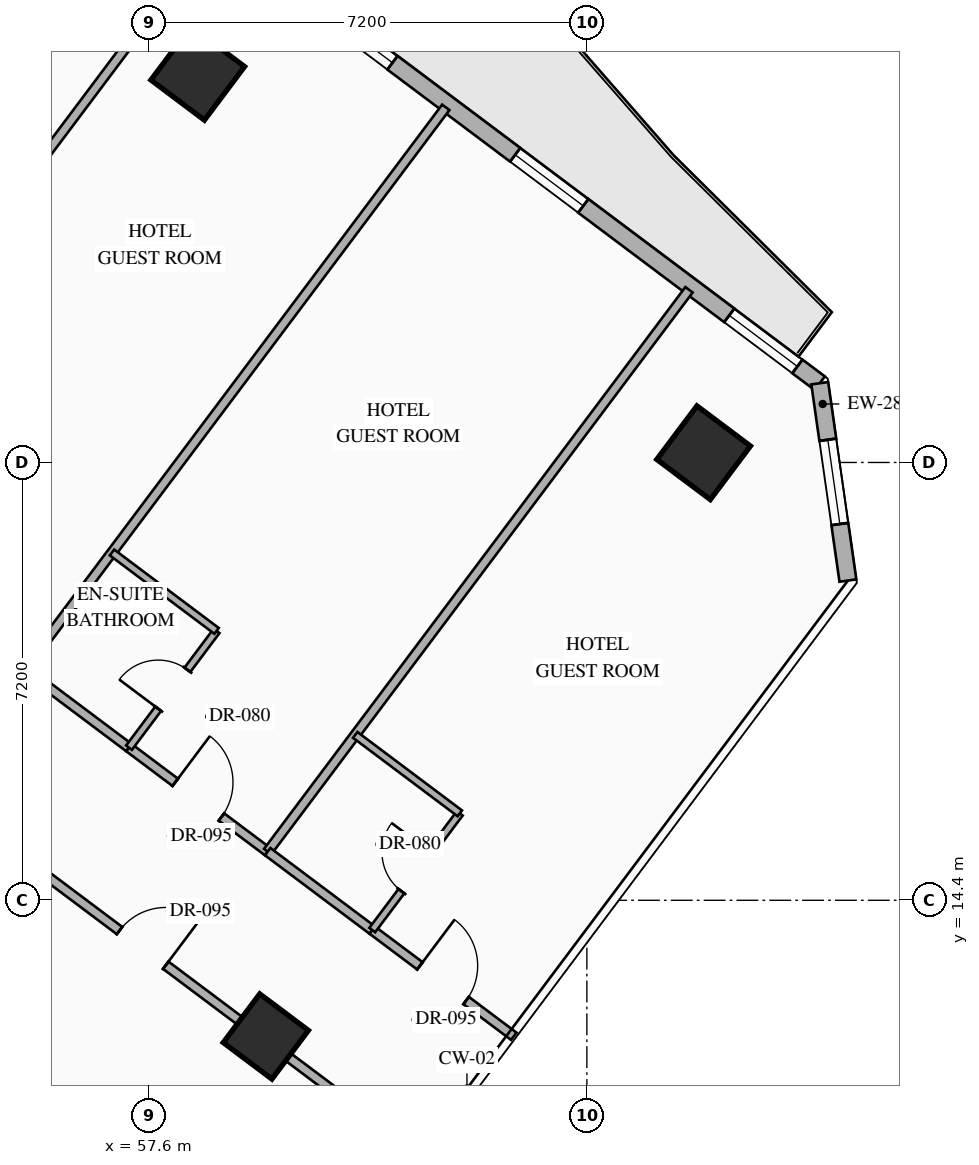
"""IFC4 building model, lengths in metres.
Left out: names, types, materials, properties, quantities, classifications, styles, units other than length and angle.
Written with IfcOpenShell. Run it as: python <this file> out.ifc"""

import sys

from ifc_helpers import new_model, si_unit, direction, frame, frame_2d, origin, origin_2d, place, context, subcontext, project, spatial, rectangle, hollow_rectangle, extrude, element, fill, save


model = new_model("IFC4")
c1 = context("Model", 3, precision=1e-05, world=origin(), true_north=direction((0.0, 1.0)))
c2 = subcontext(c1, "Body", "Model", "MODEL_VIEW")
j1 = project(units=[si_unit("LENGTHUNIT", "METRE"), si_unit("PLANEANGLEUNIT", "RADIAN")], contexts=[c1])
p1 = place(None, origin())
s1 = spatial("IfcSite", under=j1, at=p1, CompositionType="ELEMENT")
p2 = place(p1, origin())
s2 = spatial("IfcBuilding", under=s1, at=p2, CompositionType="ELEMENT")
p3 = place(p2, frame((0.0, 0.0, 43.3)))
s3 = spatial("IfcBuildingStorey", under=s2, at=p3, CompositionType="ELEMENT", Elevation=43.3)
for number, where, z_axis, x_axis in (
    (1, (58.4, 28.0, 0.0), (0.0, 0.0, 1.0), (0.8, -0.6, 0.0)),
    (2, (66.72, 21.76, 0.0), (0.0, 0.0, 1.0), (0.8, -0.6, 0.0)),
):
    element("IfcColumn", number, at=place(p3, frame(where, z_axis=z_axis, x_axis=x_axis)), inside=s3, PredefinedType="COLUMN", context=c2, shape_type="SweptSolid", body=[
        extrude(hollow_rectangle(XDim=1.1, YDim=1.1, WallThickness=0.04, at=origin_2d()), origin(), (0.0, 0.0, 1.0), 3.35),
    ])
p4 = place(p3, frame((59.52, 12.16, 0.0), z_axis=(0.0, 0.0, 1.0), x_axis=(0.799999996291, -0.600000004945, 0.0)))
e3 = element("IfcColumn", 3, at=p4, inside=s3, PredefinedType="COLUMN", context=c2, shape_type="SweptSolid", body=[
    extrude(hollow_rectangle(XDim=1.0, YDim=1.0, WallThickness=0.038, at=origin_2d()), origin(), (0.0, 0.0, 1.0), 3.35),
])
p5 = place(p3, frame((44.86, 40.73, 0.0), z_axis=(0.0, 0.0, 1.0), x_axis=(0.800006902154, -0.599990797017, 0.0)))
e4 = element("IfcWall", 4, at=p5, inside=s3, PredefinedType="STANDARD", context=c2, shape_type="SweptSolid", body=[
    extrude(rectangle(XDim=29.712, YDim=0.28, at=frame_2d((14.856, 0.0))), origin(), (0.0, 0.0, 1.0), 3.13),
])
p6 = place(p5, frame((14.249, 0.0, 0.0)))
e5 = element("IfcOpeningElement", 5, at=p6, cuts=e4, PredefinedType="OPENING", context=c2, shape_type="SweptSolid", body=[
    extrude(rectangle(XDim=1.1, YDim=2.2, at=frame_2d((0.55, 1.1))), frame((0.0, 0.15, 0.0), z_axis=(0.0, -1.0, 0.0), x_axis=(1.0, 0.0, 0.0)), (0.0, 0.0, 1.0), 0.3),
])
p7 = place(p5, frame((1.612, 0.0, 0.85)))
e6 = element("IfcOpeningElement", 6, at=p7, cuts=e4, PredefinedType="OPENING", context=c2, shape_type="SweptSolid", body=[
    extrude(rectangle(XDim=1.4, YDim=1.8, at=frame_2d((0.7, 0.9))), frame((0.0, 0.15, 0.0), z_axis=(0.0, -1.0, 0.0), x_axis=(1.0, 0.0, 0.0)), (0.0, 0.0, 1.0), 0.3),
])
p8 = place(p5, frame((5.667, 0.0, 0.85)))
e7 = element("IfcOpeningElement", 7, at=p8, cuts=e4, PredefinedType="OPENING", context=c2, shape_type="SweptSolid", body=[
    extrude(rectangle(XDim=1.4, YDim=1.8, at=frame_2d((0.7, 0.9))), frame((0.0, 0.15, 0.0), z_axis=(0.0, -1.0, 0.0), x_axis=(1.0, 0.0, 0.0)), (0.0, 0.0, 1.0), 0.3),
])
p9 = place(p5, frame((9.912, 0.0, 0.85)))
e8 = element("IfcOpeningElement", 8, at=p9, cuts=e4, PredefinedType="OPENING", context=c2, shape_type="SweptSolid", body=[
    extrude(rectangle(XDim=1.4, YDim=1.8, at=frame_2d((0.7, 0.9))), frame((0.0, 0.15, 0.0), z_axis=(0.0, -1.0, 0.0), x_axis=(1.0, 0.0, 0.0)), (0.0, 0.0, 1.0), 0.3),
])
p10 = place(p5, frame((19.528, 0.0, 0.85)))
e9 = element("IfcOpeningElement", 9, at=p10, cuts=e4, PredefinedType="OPENING", context=c2, shape_type="SweptSolid", body=[
    extrude(rectangle(XDim=1.4, YDim=1.8, at=frame_2d((0.7, 0.9))), frame((0.0, 0.15, 0.0), z_axis=(0.0, -1.0, 0.0), x_axis=(1.0, 0.0, 0.0)), (0.0, 0.0, 1.0), 0.3),
])
p11 = place(p5, frame((23.451, 0.0, 0.85)))
e10 = element("IfcOpeningElement", 10, at=p11, cuts=e4, PredefinedType="OPENING", context=c2, shape_type="SweptSolid", body=[
    extrude(rectangle(XDim=1.4, YDim=1.8, at=frame_2d((0.7, 0.9))), frame((0.0, 0.15, 0.0), z_axis=(0.0, -1.0, 0.0), x_axis=(1.0, 0.0, 0.0)), (0.0, 0.0, 1.0), 0.3),
])
p12 = place(p5, frame((27.852, 0.0, 0.85)))
e11 = element("IfcOpeningElement", 11, at=p12, cuts=e4, PredefinedType="OPENING", context=c2, shape_type="SweptSolid", body=[
    extrude(rectangle(XDim=1.4, YDim=1.8, at=frame_2d((0.7, 0.9))), frame((0.0, 0.15, 0.0), z_axis=(0.0, -1.0, 0.0), x_axis=(1.0, 0.0, 0.0)), (0.0, 0.0, 1.0), 0.3),
])
p13 = place(p3, frame((68.63, 22.903, 0.0), z_axis=(0.0, 0.0, 1.0), x_axis=(0.141285803956, -0.989968848803, 0.0)))
e12 = element("IfcWall", 12, at=p13, inside=s3, PredefinedType="STANDARD", context=c2, shape_type="SweptSolid", body=[
    extrude(rectangle(XDim=3.278, YDim=0.28, at=frame_2d((1.639, 0.0))), origin(), (0.0, 0.0, 1.0), 3.13),
])
p14 = place(p13, frame((0.939, 0.0, 0.85)))
e13 = element("IfcOpeningElement", 13, at=p14, cuts=e12, PredefinedType="OPENING", context=c2, shape_type="SweptSolid", body=[
    extrude(rectangle(XDim=1.4, YDim=1.8, at=frame_2d((0.7, 0.9))), frame((0.0, 0.15, 0.0), z_axis=(0.0, -1.0, 0.0), x_axis=(1.0, 0.0, 0.0)), (0.0, 0.0, 1.0), 0.3),
])
for number, where, z_axis, x_axis in (
    (14, (51.71, 21.08, 0.0), (0.0, 0.0, 1.0), (0.6, 0.8, 0.0)),
    (15, (55.55, 18.2, 0.0), (0.0, 0.0, 1.0), (0.6, 0.8, 0.0)),
):
    element("IfcWall", number, at=place(p3, frame(where, z_axis=z_axis, x_axis=x_axis)), inside=s3, PredefinedType="PARTITIONING", context=c2, shape_type="SweptSolid", body=[
        extrude(rectangle(XDim=11.55, YDim=0.15, at=frame_2d((5.775, 0.0))), origin(), (0.0, 0.0, 1.0), 3.13),
    ])
p15 = place(p3, frame((55.55, 18.2, 0.0), z_axis=(0.0, 0.0, 1.0), x_axis=(0.79998637334, -0.60001816845, 0.0)))
e16 = element("IfcWall", 16, at=p15, inside=s3, PredefinedType="PARTITIONING", context=c2, shape_type="SweptSolid", body=[
    extrude(rectangle(XDim=2.15, YDim=0.15, at=frame_2d((1.075, 0.0))), origin(), (0.0, 0.0, 1.0), 2.775),
])
p16 = place(p3, frame((57.27, 16.91, 0.0), z_axis=(0.0, 0.0, 1.0), x_axis=(0.800010279488, -0.599986293772, 0.0)))
e17 = element("IfcWall", 17, at=p16, inside=s3, PredefinedType="PARTITIONING", context=c2, shape_type="SweptSolid", body=[
    extrude(rectangle(XDim=2.85, YDim=0.15, at=frame_2d((1.425, 0.0))), origin(), (0.0, 0.0, 1.0), 2.775),
])
p17 = place(p16, frame((0.95, 0.0, 0.0)))
e18 = element("IfcOpeningElement", 18, at=p17, cuts=e17, PredefinedType="OPENING", context=c2, shape_type="SweptSolid", body=[
    extrude(rectangle(XDim=0.95, YDim=2.15, at=frame_2d((0.475, 1.075))), frame((0.0, 0.085, 0.0), z_axis=(0.0, -1.0, 0.0), x_axis=(1.0, 0.0, 0.0)), (0.0, 0.0, 1.0), 0.17),
])
p18 = place(p3, frame((57.27, 16.91, 0.0), z_axis=(0.0, 0.0, 1.0), x_axis=(0.599951172744, 0.800036618114, 0.0)))
e19 = element("IfcWall", 19, at=p18, inside=s3, PredefinedType="PARTITIONING", context=c2, shape_type="SweptSolid", body=[
    extrude(rectangle(XDim=2.4, YDim=0.12, at=frame_2d((1.2, 0.0))), origin(), (0.0, 0.0, 1.0), 3.13),
])
p19 = place(p18, frame((0.8, 0.0, 0.0)))
e20 = element("IfcOpeningElement", 20, at=p19, cuts=e19, PredefinedType="OPENING", context=c2, shape_type="SweptSolid", body=[
    extrude(rectangle(XDim=0.8, YDim=2.06, at=frame_2d((0.4, 1.03))), frame((0.0, 0.07, 0.0), z_axis=(0.0, -1.0, 0.0), x_axis=(1.0, 0.0, 0.0)), (0.0, 0.0, 1.0), 0.14),
])
p20 = place(p3, frame((56.99, 20.12, 0.0), z_axis=(0.0, 0.0, 1.0), x_axis=(0.79998637334, -0.60001816845, 0.0)))
e21 = element("IfcWall", 21, at=p20, inside=s3, PredefinedType="PARTITIONING", context=c2, shape_type="SweptSolid", body=[
    extrude(rectangle(XDim=2.15, YDim=0.12, at=frame_2d((1.075, 0.0))), origin(), (0.0, 0.0, 1.0), 3.13),
])
p21 = place(p3, frame((59.55, 15.2, 0.0), z_axis=(0.0, 0.0, 1.0), x_axis=(0.599996617946, 0.80000253653, 0.0)))
e22 = element("IfcWall", 22, at=p21, inside=s3, PredefinedType="PARTITIONING", context=c2, shape_type="SweptSolid", body=[
    extrude(rectangle(XDim=11.55, YDim=0.15, at=frame_2d((5.775, 0.0))), origin(), (0.0, 0.0, 1.0), 3.13),
])
p22 = place(p3, frame((59.55, 15.2, 0.0), z_axis=(0.0, 0.0, 1.0), x_axis=(0.79998637334, -0.60001816845, 0.0)))
e23 = element("IfcWall", 23, at=p22, inside=s3, PredefinedType="PARTITIONING", context=c2, shape_type="SweptSolid", body=[
    extrude(rectangle(XDim=2.15, YDim=0.15, at=frame_2d((1.075, 0.0))), origin(), (0.0, 0.0, 1.0), 2.775),
])
p23 = place(p3, frame((61.27, 13.91, 0.0), z_axis=(0.0, 0.0, 1.0), x_axis=(0.800010068184, -0.59998657552, 0.0)))
e24 = element("IfcWall", 24, at=p23, inside=s3, PredefinedType="PARTITIONING", context=c2, shape_type="SweptSolid", body=[
    extrude(rectangle(XDim=2.91, YDim=0.15, at=frame_2d((1.455, 0.0))), origin(), (0.0, 0.0, 1.0), 3.13),
])
p24 = place(p23, frame((0.98, 0.0, 0.0)))
e25 = element("IfcOpeningElement", 25, at=p24, cuts=e24, PredefinedType="OPENING", context=c2, shape_type="SweptSolid", body=[
    extrude(rectangle(XDim=0.95, YDim=2.15, at=frame_2d((0.475, 1.075))), frame((0.0, 0.085, 0.0), z_axis=(0.0, -1.0, 0.0), x_axis=(1.0, 0.0, 0.0)), (0.0, 0.0, 1.0), 0.17),
])
p25 = place(p3, frame((61.27, 13.91, 0.0), z_axis=(0.0, 0.0, 1.0), x_axis=(0.599951172744, 0.800036618114, 0.0)))
e26 = element("IfcWall", 26, at=p25, inside=s3, PredefinedType="PARTITIONING", context=c2, shape_type="SweptSolid", body=[
    extrude(rectangle(XDim=2.4, YDim=0.12, at=frame_2d((1.2, 0.0))), origin(), (0.0, 0.0, 1.0), 3.13),
])
p26 = place(p25, frame((0.8, 0.0, 0.0)))
e27 = element("IfcOpeningElement", 27, at=p26, cuts=e26, PredefinedType="OPENING", context=c2, shape_type="SweptSolid", body=[
    extrude(rectangle(XDim=0.8, YDim=2.06, at=frame_2d((0.4, 1.03))), frame((0.0, 0.07, 0.0), z_axis=(0.0, -1.0, 0.0), x_axis=(1.0, 0.0, 0.0)), (0.0, 0.0, 1.0), 0.14),
])
p27 = place(p3, frame((60.99, 17.12, 0.0), z_axis=(0.0, 0.0, 1.0), x_axis=(0.79998637334, -0.60001816845, 0.0)))
e28 = element("IfcWall", 28, at=p27, inside=s3, PredefinedType="PARTITIONING", context=c2, shape_type="SweptSolid", body=[
    extrude(rectangle(XDim=2.15, YDim=0.12, at=frame_2d((1.075, 0.0))), origin(), (0.0, 0.0, 1.0), 3.13),
])
p28 = place(p3, frame((52.89, 17.07, 0.0), z_axis=(0.0, 0.0, 1.0), x_axis=(0.8, -0.6, 0.0)))
e29 = element("IfcWall", 29, at=p28, inside=s3, PredefinedType="PARTITIONING", context=c2, shape_type="SweptSolid", body=[
    extrude(rectangle(XDim=11.51, YDim=0.15, at=frame_2d((5.755, 0.0))), origin(), (0.0, 0.0, 1.0), 2.425),
])
p29 = place(p28, frame((5.28, 0.0, 0.0)))
e30 = element("IfcOpeningElement", 30, at=p29, cuts=e29, PredefinedType="OPENING", context=c2, shape_type="SweptSolid", body=[
    extrude(rectangle(XDim=0.95, YDim=2.15, at=frame_2d((0.475, 1.075))), frame((0.0, 0.085, 0.0), z_axis=(0.0, -1.0, 0.0), x_axis=(1.0, 0.0, 0.0)), (0.0, 0.0, 1.0), 0.17),
])
p30 = place(p10, origin())
e31 = element("IfcWindow", 31, at=p30, inside=s3, PartitioningType="SINGLE_PANEL", PredefinedType="WINDOW", context=c2, shape_type="SweptSolid", body=[
    extrude(rectangle(XDim=1.4, YDim=1.8, at=frame_2d((0.7, 0.9))), frame((0.0, 0.03, 0.0), z_axis=(0.0, -1.0, 0.0), x_axis=(1.0, 0.0, 0.0)), (0.0, 0.0, 1.0), 0.06),
])
fill(e9, e31)
p31 = place(p11, origin())
e32 = element("IfcWindow", 32, at=p31, inside=s3, PartitioningType="SINGLE_PANEL", PredefinedType="WINDOW", context=c2, shape_type="SweptSolid", body=[
    extrude(rectangle(XDim=1.4, YDim=1.8, at=frame_2d((0.7, 0.9))), frame((0.0, 0.03, 0.0), z_axis=(0.0, -1.0, 0.0), x_axis=(1.0, 0.0, 0.0)), (0.0, 0.0, 1.0), 0.06),
])
fill(e10, e32)
p32 = place(p12, origin())
e33 = element("IfcWindow", 33, at=p32, inside=s3, PartitioningType="SINGLE_PANEL", PredefinedType="WINDOW", context=c2, shape_type="SweptSolid", body=[
    extrude(rectangle(XDim=1.4, YDim=1.8, at=frame_2d((0.7, 0.9))), frame((0.0, 0.03, 0.0), z_axis=(0.0, -1.0, 0.0), x_axis=(1.0, 0.0, 0.0)), (0.0, 0.0, 1.0), 0.06),
])
fill(e11, e33)
p33 = place(p14, origin())
e34 = element("IfcWindow", 34, at=p33, inside=s3, PartitioningType="SINGLE_PANEL", PredefinedType="WINDOW", context=c2, shape_type="SweptSolid", body=[
    extrude(rectangle(XDim=1.4, YDim=1.8, at=frame_2d((0.7, 0.9))), frame((0.0, 0.03, 0.0), z_axis=(0.0, -1.0, 0.0), x_axis=(1.0, 0.0, 0.0)), (0.0, 0.0, 1.0), 0.06),
])
fill(e13, e34)
p34 = place(p17, origin())
e35 = element("IfcDoor", 35, at=p34, inside=s3, OperationType="SINGLE_SWING_LEFT", PredefinedType="DOOR", context=c2, shape_type="SweptSolid", body=[
    extrude(rectangle(XDim=0.95, YDim=2.15, at=frame_2d((0.475, 1.075))), frame((0.0, 0.025, 0.0), z_axis=(0.0, -1.0, 0.0), x_axis=(1.0, 0.0, 0.0)), (0.0, 0.0, 1.0), 0.05),
])
fill(e18, e35)
p35 = place(p19, origin())
e36 = element("IfcDoor", 36, at=p35, inside=s3, OperationType="SINGLE_SWING_LEFT", PredefinedType="DOOR", context=c2, shape_type="SweptSolid", body=[
    extrude(rectangle(XDim=0.8, YDim=2.06, at=frame_2d((0.4, 1.03))), frame((0.0, 0.025, 0.0), z_axis=(0.0, -1.0, 0.0), x_axis=(1.0, 0.0, 0.0)), (0.0, 0.0, 1.0), 0.05),
])
fill(e20, e36)
p36 = place(p24, origin())
e37 = element("IfcDoor", 37, at=p36, inside=s3, OperationType="SINGLE_SWING_LEFT", PredefinedType="DOOR", context=c2, shape_type="SweptSolid", body=[
    extrude(rectangle(XDim=0.95, YDim=2.15, at=frame_2d((0.475, 1.075))), frame((0.0, 0.025, 0.0), z_axis=(0.0, -1.0, 0.0), x_axis=(1.0, 0.0, 0.0)), (0.0, 0.0, 1.0), 0.05),
])
fill(e25, e37)
p37 = place(p26, origin())
e38 = element("IfcDoor", 38, at=p37, inside=s3, OperationType="SINGLE_SWING_RIGHT", PredefinedType="DOOR", context=c2, shape_type="SweptSolid", body=[
    extrude(rectangle(XDim=0.8, YDim=2.06, at=frame_2d((0.4, 1.03))), frame((0.0, 0.025, 0.0), z_axis=(0.0, -1.0, 0.0), x_axis=(1.0, 0.0, 0.0)), (0.0, 0.0, 1.0), 0.05),
])
fill(e27, e38)
p38 = place(p29, origin())
e39 = element("IfcDoor", 39, at=p38, inside=s3, OperationType="SINGLE_SWING_RIGHT", PredefinedType="DOOR", context=c2, shape_type="SweptSolid", body=[
    extrude(rectangle(XDim=0.95, YDim=2.15, at=frame_2d((0.475, 1.075))), frame((0.0, 0.025, 0.0), z_axis=(0.0, -1.0, 0.0), x_axis=(1.0, 0.0, 0.0)), (0.0, 0.0, 1.0), 0.05),
])
fill(e30, e39)
save(model, sys.argv[1])
